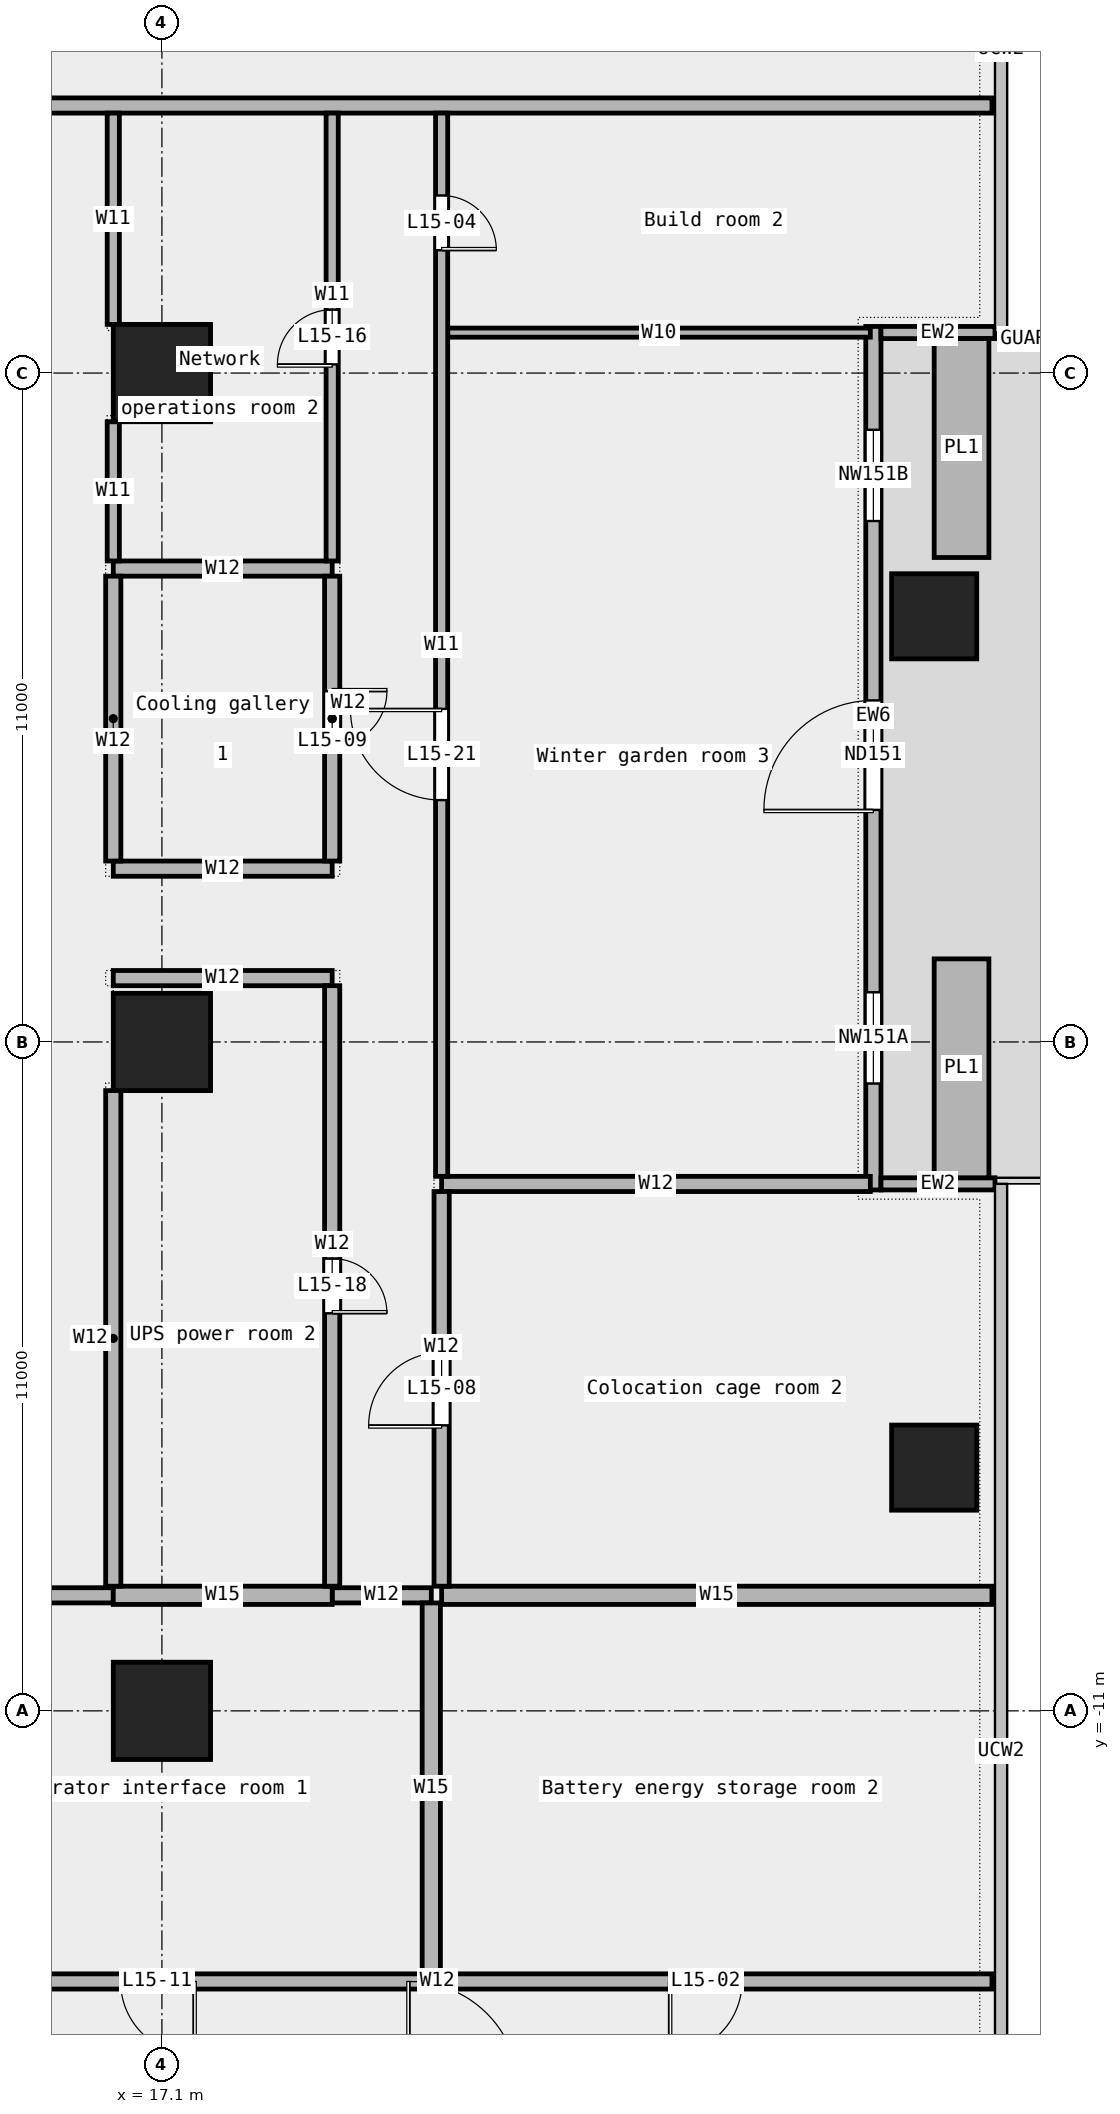
"""IFC4 building model, lengths in metres.
Left out: names, types, materials, properties, quantities, classifications, styles, units other than length and angle.
Written with IfcOpenShell. Run it as: python <this file> out.ifc"""

import sys

from ifc_helpers import new_model, si_unit, direction, frame, frame_2d, origin, origin_2d, place, context, subcontext, project, spatial, rectangle, extrude, element, fill, save


model = new_model("IFC4")
c1 = context("Model", 3, precision=1e-05, world=origin(), true_north=direction((0.0, 1.0)))
c2 = subcontext(c1, "Body", "Model", "MODEL_VIEW")
j1 = project(units=[si_unit("LENGTHUNIT", "METRE"), si_unit("PLANEANGLEUNIT", "RADIAN")], contexts=[c1])
p1 = place(None, origin())
s1 = spatial("IfcSite", under=j1, at=p1, CompositionType="ELEMENT")
p2 = place(p1, origin())
s2 = spatial("IfcBuilding", under=s1, at=p2, CompositionType="ELEMENT")
p3 = place(p2, frame((0.0, 0.0, 79.0)))
s3 = spatial("IfcBuildingStorey", under=s2, at=p3, CompositionType="ELEMENT", Elevation=79.0)
for number, where, z_axis, x_axis in (
    (1, (29.8, -7.0, 0.0), (0.0, 0.0, 1.0), (1.0, 0.0, 0.0)),
    (2, (29.8, 7.0, 0.0), (0.0, 0.0, 1.0), (1.0, 0.0, 0.0)),
):
    element("IfcColumn", number, at=place(p3, frame(where, z_axis=z_axis, x_axis=x_axis)), inside=s3, PredefinedType="COLUMN", context=c2, shape_type="SweptSolid", body=[
        extrude(rectangle(XDim=1.4, YDim=1.4, at=origin_2d()), origin(), (0.0, 0.0, 1.0), 4.35),
    ])
for number, where, z_axis, x_axis in (
    (3, (17.1, -11.0, 0.0), (0.0, 0.0, 1.0), (1.0, 0.0, 0.0)),
    (4, (17.1, 0.0, 0.0), (0.0, 0.0, 1.0), (1.0, 0.0, 0.0)),
    (5, (17.1, 11.0, 0.0), (0.0, 0.0, 1.0), (1.0, 0.0, 0.0)),
):
    element("IfcColumn", number, at=place(p3, frame(where, z_axis=z_axis, x_axis=x_axis)), inside=s3, PredefinedType="COLUMN", context=c2, shape_type="SweptSolid", body=[
        extrude(rectangle(XDim=1.6, YDim=1.6, at=origin_2d()), origin(), (0.0, 0.0, 1.0), 4.35),
    ])
p4 = place(p3, frame((28.8, -2.433, 0.0), z_axis=(0.0, 0.0, 1.0), x_axis=(0.0, 1.0, 0.0)))
e6 = element("IfcWall", 6, at=p4, inside=s3, PredefinedType="STANDARD", context=c2, shape_type="SweptSolid", body=[
    extrude(rectangle(XDim=14.2, YDim=0.25, at=frame_2d((7.1, 0.0))), origin(), (0.0, 0.0, 1.0), 4.35),
])
p5 = place(p4, frame((1.75, 0.0, 0.45)))
e7 = element("IfcOpeningElement", 7, at=p5, cuts=e6, PredefinedType="OPENING", context=c2, shape_type="SweptSolid", body=[
    extrude(rectangle(XDim=1.5, YDim=3.0, at=frame_2d((0.75, 1.5))), frame((0.0, 0.137, 0.0), z_axis=(0.0, -1.0, 0.0), x_axis=(1.0, 0.0, 0.0)), (0.0, 0.0, 1.0), 0.274),
])
p6 = place(p4, frame((6.25, 0.0, 0.0)))
e8 = element("IfcOpeningElement", 8, at=p6, cuts=e6, PredefinedType="OPENING", context=c2, shape_type="SweptSolid", body=[
    extrude(rectangle(XDim=1.8, YDim=2.4, at=frame_2d((0.9, 1.2))), frame((0.0, 0.137, 0.0), z_axis=(0.0, -1.0, 0.0), x_axis=(1.0, 0.0, 0.0)), (0.0, 0.0, 1.0), 0.274),
])
p7 = place(p4, frame((11.0, 0.0, 0.45)))
e9 = element("IfcOpeningElement", 9, at=p7, cuts=e6, PredefinedType="OPENING", context=c2, shape_type="SweptSolid", body=[
    extrude(rectangle(XDim=1.5, YDim=3.0, at=frame_2d((0.75, 1.5))), frame((0.0, 0.137, 0.0), z_axis=(0.0, -1.0, 0.0), x_axis=(1.0, 0.0, 0.0)), (0.0, 0.0, 1.0), 0.274),
])
for number, where, z_axis, x_axis in (
    (10, (30.8, -2.333, 0.0), (0.0, 0.0, 1.0), (-1.0, 0.0, 0.0)),
    (11, (30.8, 11.667, 0.0), (0.0, 0.0, 1.0), (-1.0, 0.0, 0.0)),
):
    element("IfcWall", number, at=place(p3, frame(where, z_axis=z_axis, x_axis=x_axis)), inside=s3, PredefinedType="STANDARD", context=c2, shape_type="SweptSolid", body=[
        extrude(rectangle(XDim=1.875, YDim=0.2, at=frame_2d((0.938, 0.0))), origin(), (0.0, 0.0, 1.0), 4.35),
    ])
for number, where, z_axis, x_axis in (
    (12, (30.25, -2.233, 0.0), (0.0, 0.0, 1.0), (0.0, 1.0, 0.0)),
    (13, (30.25, 7.967, 0.0), (0.0, 0.0, 1.0), (0.0, 1.0, 0.0)),
):
    element("IfcWall", number, at=place(p3, frame(where, z_axis=z_axis, x_axis=x_axis)), inside=s3, PredefinedType="STANDARD", context=c2, shape_type="SweptSolid", body=[
        extrude(rectangle(XDim=3.6, YDim=0.9, at=frame_2d((1.8, 0.0))), origin(), (0.0, 0.0, 1.0), 0.7),
    ])
p8 = place(p3, frame((12.51, -15.45, 0.0), z_axis=(0.0, 0.0, 1.0), x_axis=(1.0, 0.0, 0.0)))
e14 = element("IfcWall", 14, at=p8, inside=s3, PredefinedType="PARTITIONING", context=c2, shape_type="SweptSolid", body=[
    extrude(rectangle(XDim=18.24, YDim=0.25, at=frame_2d((9.12, 0.0))), origin(), (0.0, 0.0, 1.0), 4.35),
])
p9 = place(p8, frame((12.93, 0.0, 0.0)))
e15 = element("IfcOpeningElement", 15, at=p9, cuts=e14, PredefinedType="OPENING", context=c2, shape_type="SweptSolid", body=[
    extrude(rectangle(XDim=1.2, YDim=2.1, at=frame_2d((0.6, 1.05))), frame((0.0, 0.137, 0.0), z_axis=(0.0, -1.0, 0.0), x_axis=(1.0, 0.0, 0.0)), (0.0, 0.0, 1.0), 0.274),
])
p10 = place(p8, frame((3.91, 0.0, 0.0)))
e16 = element("IfcOpeningElement", 16, at=p10, cuts=e14, PredefinedType="OPENING", context=c2, shape_type="SweptSolid", body=[
    extrude(rectangle(XDim=1.2, YDim=2.1, at=frame_2d((0.6, 1.05))), frame((0.0, 0.137, 0.0), z_axis=(0.0, -1.0, 0.0), x_axis=(1.0, 0.0, 0.0)), (0.0, 0.0, 1.0), 0.274),
])
p11 = place(p3, frame((12.51, -9.1, 0.0), z_axis=(0.0, 0.0, 1.0), x_axis=(1.0, 0.0, 0.0)))
e17 = element("IfcWall", 17, at=p11, inside=s3, PredefinedType="PARTITIONING", context=c2, shape_type="SweptSolid", body=[
    extrude(rectangle(XDim=3.79, YDim=0.25, at=frame_2d((1.895, 0.0))), origin(), (0.0, 0.0, 1.0), 4.35),
])
p12 = place(p3, frame((19.9, -9.1, 0.0), z_axis=(0.0, 0.0, 1.0), x_axis=(1.0, 0.0, 0.0)))
e18 = element("IfcWall", 18, at=p12, inside=s3, PredefinedType="PARTITIONING", context=c2, shape_type="SweptSolid", body=[
    extrude(rectangle(XDim=1.63, YDim=0.25, at=frame_2d((0.815, 0.0))), origin(), (0.0, 0.0, 1.0), 4.35),
])
p13 = place(p3, frame((16.3, -9.1, 0.0), z_axis=(0.0, 0.0, 1.0), x_axis=(1.0, 0.0, 0.0)))
e19 = element("IfcWall", 19, at=p13, inside=s3, PredefinedType="PARTITIONING", context=c2, shape_type="SweptSolid", body=[
    extrude(rectangle(XDim=3.6, YDim=0.3, at=frame_2d((1.8, 0.0))), origin(), (0.0, 0.0, 1.0), 4.35),
])
p14 = place(p3, frame((21.7, -9.1, 0.0), z_axis=(0.0, 0.0, 1.0), x_axis=(1.0, 0.0, 0.0)))
e20 = element("IfcWall", 20, at=p14, inside=s3, PredefinedType="PARTITIONING", context=c2, shape_type="SweptSolid", body=[
    extrude(rectangle(XDim=9.05, YDim=0.3, at=frame_2d((4.525, 0.0))), origin(), (0.0, 0.0, 1.0), 4.35),
])
p15 = place(p3, frame((21.7, -2.335, 0.0), z_axis=(0.0, 0.0, 1.0), x_axis=(1.0, 0.0, 0.0)))
e21 = element("IfcWall", 21, at=p15, inside=s3, PredefinedType="PARTITIONING", context=c2, shape_type="SweptSolid", body=[
    extrude(rectangle(XDim=7.05, YDim=0.25, at=frame_2d((3.525, 0.0))), origin(), (0.0, 0.0, 1.0), 4.35),
])
for number, where, z_axis, x_axis in (
    (22, (16.3, 1.05, 0.0), (0.0, 0.0, 1.0), (1.0, 0.0, 0.0)),
    (23, (16.3, 2.85, 0.0), (0.0, 0.0, 1.0), (1.0, 0.0, 0.0)),
    (24, (16.3, 7.785, 0.0), (0.0, 0.0, 1.0), (1.0, 0.0, 0.0)),
):
    element("IfcWall", number, at=place(p3, frame(where, z_axis=z_axis, x_axis=x_axis)), inside=s3, PredefinedType="PARTITIONING", context=c2, shape_type="SweptSolid", body=[
        extrude(rectangle(XDim=3.6, YDim=0.25, at=frame_2d((1.8, 0.0))), origin(), (0.0, 0.0, 1.0), 4.35),
    ])
p16 = place(p3, frame((21.8, 11.665, 0.0), z_axis=(0.0, 0.0, 1.0), x_axis=(1.0, 0.0, 0.0)))
e25 = element("IfcWall", 25, at=p16, inside=s3, PredefinedType="PARTITIONING", context=c2, shape_type="SweptSolid", body=[
    extrude(rectangle(XDim=6.95, YDim=0.15, at=frame_2d((3.475, 0.0))), origin(), (0.0, 0.0, 1.0), 4.35),
])
p17 = place(p3, frame((-2.255, 15.4, 0.0), z_axis=(0.0, 0.0, 1.0), x_axis=(1.0, 0.0, 0.0)))
e26 = element("IfcWall", 26, at=p17, inside=s3, PredefinedType="PARTITIONING", context=c2, shape_type="SweptSolid", body=[
    extrude(rectangle(XDim=33.005, YDim=0.25, at=frame_2d((16.502, 0.0))), origin(), (0.0, 0.0, 1.0), 4.35),
])
p18 = place(p17, frame((11.498, 0.0, 0.0)))
e27 = element("IfcOpeningElement", 27, at=p18, cuts=e26, PredefinedType="OPENING", context=c2, shape_type="SweptSolid", body=[
    extrude(rectangle(XDim=1.8, YDim=2.1, at=frame_2d((0.9, 1.05))), frame((0.0, 0.137, 0.0), z_axis=(0.0, -1.0, 0.0), x_axis=(1.0, 0.0, 0.0)), (0.0, 0.0, 1.0), 0.274),
])
p19 = place(p17, frame((2.52, 0.0, 0.0)))
e28 = element("IfcOpeningElement", 28, at=p19, cuts=e26, PredefinedType="OPENING", context=c2, shape_type="SweptSolid", body=[
    extrude(rectangle(XDim=1.2, YDim=2.1, at=frame_2d((0.6, 1.05))), frame((0.0, 0.137, 0.0), z_axis=(0.0, -1.0, 0.0), x_axis=(1.0, 0.0, 0.0)), (0.0, 0.0, 1.0), 0.274),
])
p20 = place(p3, frame((16.3, 7.91, 0.0), z_axis=(0.0, 0.0, 1.0), x_axis=(0.0, 1.0, 0.0)))
e29 = element("IfcWall", 29, at=p20, inside=s3, PredefinedType="PARTITIONING", context=c2, shape_type="SweptSolid", body=[
    extrude(rectangle(XDim=2.29, YDim=0.2, at=frame_2d((1.145, 0.0))), origin(), (0.0, 0.0, 1.0), 4.35),
])
p21 = place(p3, frame((16.3, 11.8, 0.0), z_axis=(0.0, 0.0, 1.0), x_axis=(0.0, 1.0, 0.0)))
e30 = element("IfcWall", 30, at=p21, inside=s3, PredefinedType="PARTITIONING", context=c2, shape_type="SweptSolid", body=[
    extrude(rectangle(XDim=3.475, YDim=0.2, at=frame_2d((1.737, 0.0))), origin(), (0.0, 0.0, 1.0), 4.35),
])
p22 = place(p3, frame((16.3, -8.95, 0.0), z_axis=(0.0, 0.0, 1.0), x_axis=(0.0, 1.0, 0.0)))
e31 = element("IfcWall", 31, at=p22, inside=s3, PredefinedType="PARTITIONING", context=c2, shape_type="SweptSolid", body=[
    extrude(rectangle(XDim=8.15, YDim=0.25, at=frame_2d((4.075, 0.0))), origin(), (0.0, 0.0, 1.0), 4.35),
])
p23 = place(p3, frame((16.3, 2.975, 0.0), z_axis=(0.0, 0.0, 1.0), x_axis=(0.0, 1.0, 0.0)))
e32 = element("IfcWall", 32, at=p23, inside=s3, PredefinedType="PARTITIONING", context=c2, shape_type="SweptSolid", body=[
    extrude(rectangle(XDim=4.685, YDim=0.25, at=frame_2d((2.342, 0.0))), origin(), (0.0, 0.0, 1.0), 4.35),
])
p24 = place(p3, frame((19.9, 7.91, 0.0), z_axis=(0.0, 0.0, 1.0), x_axis=(0.0, 1.0, 0.0)))
e33 = element("IfcWall", 33, at=p24, inside=s3, PredefinedType="PARTITIONING", context=c2, shape_type="SweptSolid", body=[
    extrude(rectangle(XDim=7.365, YDim=0.2, at=frame_2d((3.683, 0.0))), origin(), (0.0, 0.0, 1.0), 4.35),
])
p25 = place(p24, frame((3.232, 0.0, 0.0)))
e34 = element("IfcOpeningElement", 34, at=p25, cuts=e33, PredefinedType="OPENING", context=c2, shape_type="SweptSolid", body=[
    extrude(rectangle(XDim=0.9, YDim=2.1, at=frame_2d((0.45, 1.05))), frame((0.0, 0.112, 0.0), z_axis=(0.0, -1.0, 0.0), x_axis=(1.0, 0.0, 0.0)), (0.0, 0.0, 1.0), 0.224),
])
p26 = place(p3, frame((19.9, -8.95, 0.0), z_axis=(0.0, 0.0, 1.0), x_axis=(0.0, 1.0, 0.0)))
e35 = element("IfcWall", 35, at=p26, inside=s3, PredefinedType="PARTITIONING", context=c2, shape_type="SweptSolid", body=[
    extrude(rectangle(XDim=9.875, YDim=0.25, at=frame_2d((4.938, 0.0))), origin(), (0.0, 0.0, 1.0), 4.35),
])
p27 = place(p26, frame((4.488, 0.0, 0.0)))
e36 = element("IfcOpeningElement", 36, at=p27, cuts=e35, PredefinedType="OPENING", context=c2, shape_type="SweptSolid", body=[
    extrude(rectangle(XDim=0.9, YDim=2.1, at=frame_2d((0.45, 1.05))), frame((0.0, 0.137, 0.0), z_axis=(0.0, -1.0, 0.0), x_axis=(1.0, 0.0, 0.0)), (0.0, 0.0, 1.0), 0.274),
])
p28 = place(p3, frame((19.9, 2.975, 0.0), z_axis=(0.0, 0.0, 1.0), x_axis=(0.0, 1.0, 0.0)))
e37 = element("IfcWall", 37, at=p28, inside=s3, PredefinedType="PARTITIONING", context=c2, shape_type="SweptSolid", body=[
    extrude(rectangle(XDim=4.685, YDim=0.25, at=frame_2d((2.342, 0.0))), origin(), (0.0, 0.0, 1.0), 4.35),
])
p29 = place(p28, frame((1.893, 0.0, 0.0)))
e38 = element("IfcOpeningElement", 38, at=p29, cuts=e37, PredefinedType="OPENING", context=c2, shape_type="SweptSolid", body=[
    extrude(rectangle(XDim=0.9, YDim=2.1, at=frame_2d((0.45, 1.05))), frame((0.0, 0.137, 0.0), z_axis=(0.0, -1.0, 0.0), x_axis=(1.0, 0.0, 0.0)), (0.0, 0.0, 1.0), 0.274),
])
p30 = place(p3, frame((21.53, -15.325, 0.0), z_axis=(0.0, 0.0, 1.0), x_axis=(0.0, 1.0, 0.0)))
e39 = element("IfcWall", 39, at=p30, inside=s3, PredefinedType="PARTITIONING", context=c2, shape_type="SweptSolid", body=[
    extrude(rectangle(XDim=6.1, YDim=0.3, at=frame_2d((3.05, 0.0))), origin(), (0.0, 0.0, 1.0), 4.35),
])
p31 = place(p3, frame((21.7, -2.21, 0.0), z_axis=(0.0, 0.0, 1.0), x_axis=(0.0, 1.0, 0.0)))
e40 = element("IfcWall", 40, at=p31, inside=s3, PredefinedType="PARTITIONING", context=c2, shape_type="SweptSolid", body=[
    extrude(rectangle(XDim=17.485, YDim=0.2, at=frame_2d((8.742, 0.0))), origin(), (0.0, 0.0, 1.0), 4.35),
])
p32 = place(p31, frame((15.23, 0.0, 0.0)))
e41 = element("IfcOpeningElement", 41, at=p32, cuts=e40, PredefinedType="OPENING", context=c2, shape_type="SweptSolid", body=[
    extrude(rectangle(XDim=0.9, YDim=2.1, at=frame_2d((0.45, 1.05))), frame((0.0, 0.112, 0.0), z_axis=(0.0, -1.0, 0.0), x_axis=(1.0, 0.0, 0.0)), (0.0, 0.0, 1.0), 0.224),
])
p33 = place(p31, frame((6.188, 0.0, 0.0)))
e42 = element("IfcOpeningElement", 42, at=p33, cuts=e40, PredefinedType="OPENING", context=c2, shape_type="SweptSolid", body=[
    extrude(rectangle(XDim=1.5, YDim=2.1, at=frame_2d((0.75, 1.05))), frame((0.0, 0.112, 0.0), z_axis=(0.0, -1.0, 0.0), x_axis=(1.0, 0.0, 0.0)), (0.0, 0.0, 1.0), 0.224),
])
p34 = place(p3, frame((21.7, -8.95, 0.0), z_axis=(0.0, 0.0, 1.0), x_axis=(0.0, 1.0, 0.0)))
e43 = element("IfcWall", 43, at=p34, inside=s3, PredefinedType="PARTITIONING", context=c2, shape_type="SweptSolid", body=[
    extrude(rectangle(XDim=6.49, YDim=0.25, at=frame_2d((3.245, 0.0))), origin(), (0.0, 0.0, 1.0), 4.35),
])
p35 = place(p34, frame((2.645, 0.0, 0.0)))
e44 = element("IfcOpeningElement", 44, at=p35, cuts=e43, PredefinedType="OPENING", context=c2, shape_type="SweptSolid", body=[
    extrude(rectangle(XDim=1.2, YDim=2.1, at=frame_2d((0.6, 1.05))), frame((0.0, 0.137, 0.0), z_axis=(0.0, -1.0, 0.0), x_axis=(1.0, 0.0, 0.0)), (0.0, 0.0, 1.0), 0.274),
])
p36 = place(p5, origin())
e45 = element("IfcWindow", 45, at=p36, inside=s3, PartitioningType="SINGLE_PANEL", PredefinedType="WINDOW", context=c2, shape_type="SweptSolid", body=[
    extrude(rectangle(XDim=1.5, YDim=3.0, at=frame_2d((0.75, 1.5))), frame((0.0, 0.03, 0.0), z_axis=(0.0, -1.0, 0.0), x_axis=(1.0, 0.0, 0.0)), (0.0, 0.0, 1.0), 0.06),
])
fill(e7, e45)
p37 = place(p6, origin())
e46 = element("IfcDoor", 46, at=p37, inside=s3, OperationType="DOUBLE_DOOR_SINGLE_SWING", PredefinedType="DOOR", context=c2, shape_type="SweptSolid", body=[
    extrude(rectangle(XDim=1.8, YDim=2.4, at=frame_2d((0.9, 1.2))), frame((0.0, 0.025, 0.0), z_axis=(0.0, -1.0, 0.0), x_axis=(1.0, 0.0, 0.0)), (0.0, 0.0, 1.0), 0.05),
])
fill(e8, e46)
p38 = place(p7, origin())
e47 = element("IfcWindow", 47, at=p38, inside=s3, PartitioningType="SINGLE_PANEL", PredefinedType="WINDOW", context=c2, shape_type="SweptSolid", body=[
    extrude(rectangle(XDim=1.5, YDim=3.0, at=frame_2d((0.75, 1.5))), frame((0.0, 0.03, 0.0), z_axis=(0.0, -1.0, 0.0), x_axis=(1.0, 0.0, 0.0)), (0.0, 0.0, 1.0), 0.06),
])
fill(e9, e47)
p39 = place(p9, origin())
e48 = element("IfcDoor", 48, at=p39, inside=s3, OperationType="SINGLE_SWING_RIGHT", PredefinedType="DOOR", context=c2, shape_type="SweptSolid", body=[
    extrude(rectangle(XDim=1.2, YDim=2.1, at=frame_2d((0.6, 1.05))), frame((0.0, 0.025, 0.0), z_axis=(0.0, -1.0, 0.0), x_axis=(1.0, 0.0, 0.0)), (0.0, 0.0, 1.0), 0.05),
])
fill(e15, e48)
p40 = place(p32, origin())
e49 = element("IfcDoor", 49, at=p40, inside=s3, OperationType="SINGLE_SWING_RIGHT", PredefinedType="DOOR", context=c2, shape_type="SweptSolid", body=[
    extrude(rectangle(XDim=0.9, YDim=2.1, at=frame_2d((0.45, 1.05))), frame((0.0, 0.025, 0.0), z_axis=(0.0, -1.0, 0.0), x_axis=(1.0, 0.0, 0.0)), (0.0, 0.0, 1.0), 0.05),
])
fill(e41, e49)
p41 = place(p35, origin())
e50 = element("IfcDoor", 50, at=p41, inside=s3, OperationType="SINGLE_SWING_LEFT", PredefinedType="DOOR", context=c2, shape_type="SweptSolid", body=[
    extrude(rectangle(XDim=1.2, YDim=2.1, at=frame_2d((0.6, 1.05))), frame((0.0, 0.025, 0.0), z_axis=(0.0, -1.0, 0.0), x_axis=(1.0, 0.0, 0.0)), (0.0, 0.0, 1.0), 0.05),
])
fill(e44, e50)
p42 = place(p29, origin())
e51 = element("IfcDoor", 51, at=p42, inside=s3, OperationType="SINGLE_SWING_LEFT", PredefinedType="DOOR", context=c2, shape_type="SweptSolid", body=[
    extrude(rectangle(XDim=0.9, YDim=2.1, at=frame_2d((0.45, 1.05))), frame((0.0, 0.025, 0.0), z_axis=(0.0, -1.0, 0.0), x_axis=(1.0, 0.0, 0.0)), (0.0, 0.0, 1.0), 0.05),
])
fill(e38, e51)
p43 = place(p10, origin())
e52 = element("IfcDoor", 52, at=p43, inside=s3, OperationType="SINGLE_SWING_LEFT", PredefinedType="DOOR", context=c2, shape_type="SweptSolid", body=[
    extrude(rectangle(XDim=1.2, YDim=2.1, at=frame_2d((0.6, 1.05))), frame((0.0, 0.025, 0.0), z_axis=(0.0, -1.0, 0.0), x_axis=(1.0, 0.0, 0.0)), (0.0, 0.0, 1.0), 0.05),
])
fill(e16, e52)
p44 = place(p25, origin())
e53 = element("IfcDoor", 53, at=p44, inside=s3, OperationType="SINGLE_SWING_LEFT", PredefinedType="DOOR", context=c2, shape_type="SweptSolid", body=[
    extrude(rectangle(XDim=0.9, YDim=2.1, at=frame_2d((0.45, 1.05))), frame((0.0, 0.025, 0.0), z_axis=(0.0, -1.0, 0.0), x_axis=(1.0, 0.0, 0.0)), (0.0, 0.0, 1.0), 0.05),
])
fill(e34, e53)
p45 = place(p27, origin())
e54 = element("IfcDoor", 54, at=p45, inside=s3, OperationType="SINGLE_SWING_RIGHT", PredefinedType="DOOR", context=c2, shape_type="SweptSolid", body=[
    extrude(rectangle(XDim=0.9, YDim=2.1, at=frame_2d((0.45, 1.05))), frame((0.0, 0.025, 0.0), z_axis=(0.0, -1.0, 0.0), x_axis=(1.0, 0.0, 0.0)), (0.0, 0.0, 1.0), 0.05),
])
fill(e36, e54)
p46 = place(p33, origin())
e55 = element("IfcDoor", 55, at=p46, inside=s3, OperationType="DOUBLE_DOOR_SINGLE_SWING", PredefinedType="DOOR", context=c2, shape_type="SweptSolid", body=[
    extrude(rectangle(XDim=1.5, YDim=2.1, at=frame_2d((0.75, 1.05))), frame((0.0, 0.025, 0.0), z_axis=(0.0, -1.0, 0.0), x_axis=(1.0, 0.0, 0.0)), (0.0, 0.0, 1.0), 0.05),
])
fill(e42, e55)
save(model, sys.argv[1])
